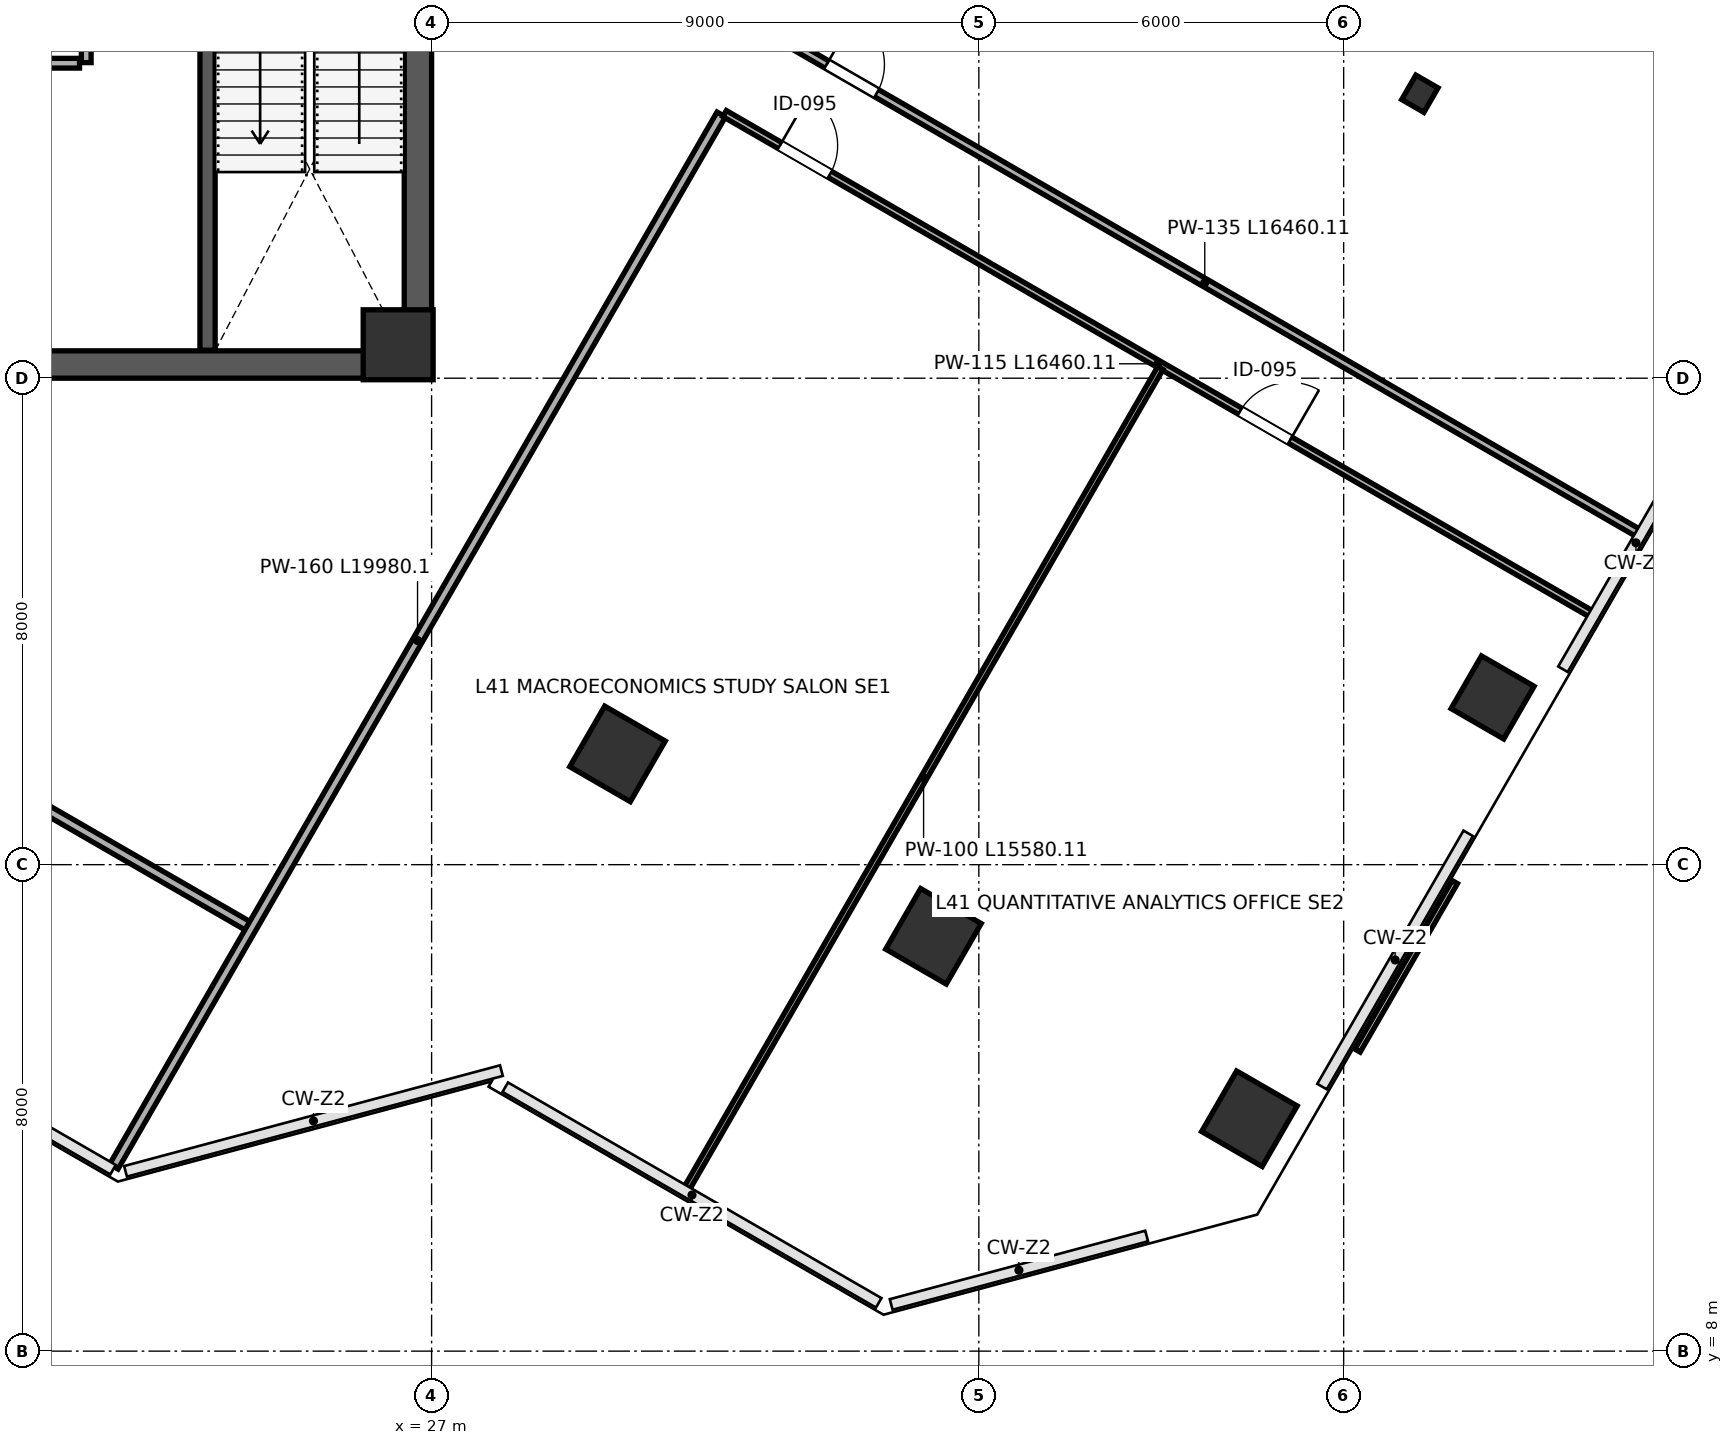
"""IFC4 building model, lengths in metres.
Left out: names, types, materials, properties, quantities, classifications, styles, units other than length and angle.
Written with IfcOpenShell. Run it as: python <this file> out.ifc"""

import sys

from ifc_helpers import new_model, si_unit, direction, frame, frame_2d, origin, origin_2d, place, context, subcontext, project, spatial, rectangle, i_section, extrude, clip, halfspace, source, transform, mapped, element, fill, save


model = new_model("IFC4")
c1 = context("Model", 3, precision=1e-05, world=origin(), true_north=direction((0.0, 1.0)))
c2 = subcontext(c1, "Body", "Model", "MODEL_VIEW")
j1 = project(units=[si_unit("LENGTHUNIT", "METRE"), si_unit("PLANEANGLEUNIT", "RADIAN")], contexts=[c1])
p1 = place(None, origin())
s1 = spatial("IfcSite", under=j1, at=p1, CompositionType="ELEMENT")
p2 = place(p1, origin())
s2 = spatial("IfcBuilding", under=s1, at=p2, CompositionType="ELEMENT")
p3 = place(p2, frame((0.0, 0.0, 183.4)))
s3 = spatial("IfcBuildingStorey", under=s2, at=p3, CompositionType="ELEMENT", Elevation=183.4)
m1 = source(origin(), c2, "Body", "SweptSolid", [
    extrude(rectangle(XDim=1.15, YDim=1.15, at=origin_2d()), origin(), (0.0, 0.0, 1.0), 4.199),
])
p4 = place(p3, frame((26.45, 24.55, 0.001), z_axis=(0.0, 0.0, 1.0), x_axis=(1.0, 0.0, 0.0)))
e1 = element("IfcColumn", 1, at=p4, inside=s3, PredefinedType="COLUMN", context=c2, shape_type="MappedRepresentation", body=[
    mapped(m1, transform((0.0, 0.0, 0.0), scale=1.0)),
])
p5 = place(p3, frame((30.057, 17.822, 0.0), z_axis=(-0.1469926888, -0.084437733161, 0.985526975104), x_axis=(-0.004085638209, 0.996393076163, 0.084759337748)))
e2 = element("IfcColumn", 2, at=p5, inside=s3, PredefinedType="COLUMN", context=c2, shape_type="Clipping", body=[
    clip(clip(extrude(rectangle(XDim=1.15, YDim=1.15, at=origin_2d()), origin(), (0.0, 0.0, 1.0), 4.262), halfspace(frame((0.0, 0.0, 0.136), z_axis=(0.0, 0.0, -1.0), x_axis=(1.0, 0.0, 0.0)), False)), halfspace(frame((0.0, 0.0, 4.126), z_axis=(0.0, 0.0, 1.0), x_axis=(1.0, 0.0, 0.0)), False)),
])
p6 = place(p3, frame((35.253, 14.822, 0.0), z_axis=(-0.176908244936, -0.135429437987, 0.974865293361), x_axis=(-0.139385824296, 0.983952324574, 0.111397553608)))
e3 = element("IfcColumn", 3, at=p6, inside=s3, PredefinedType="COLUMN", context=c2, shape_type="Clipping", body=[
    clip(clip(extrude(rectangle(XDim=1.15, YDim=1.15, at=origin_2d()), origin(), (0.0, 0.0, 1.0), 4.309), halfspace(frame((0.0, 0.0, 0.18), z_axis=(0.0, 0.0, -1.0), x_axis=(1.0, 0.0, 0.0)), False)), halfspace(frame((0.0, 0.0, 4.128), z_axis=(0.0, 0.0, 1.0), x_axis=(1.0, 0.0, 0.0)), False)),
])
p7 = place(p3, frame((43.253, 28.678, 0.0), z_axis=(-0.038418366003, -0.219517330227, 0.974851871252), x_axis=(-0.769030881338, 0.629424774115, 0.111426914518)))
e4 = element("IfcColumn", 4, at=p7, inside=s3, PredefinedType="COLUMN", context=c2, shape_type="Clipping", body=[
    clip(clip(extrude(i_section(OverallWidth=0.421, OverallDepth=0.465, WebThickness=0.045, FlangeThickness=0.072, FilletRadius=0.015, at=origin_2d()), origin(), (0.0, 0.0, 1.0), 4.309), halfspace(frame((0.0, 0.0, 0.071), z_axis=(0.0, 0.0, -1.0), x_axis=(1.0, 0.0, 0.0)), False)), halfspace(frame((0.0, 0.0, 4.238), z_axis=(0.0, 0.0, 1.0), x_axis=(1.0, 0.0, 0.0)), False)),
])
p8 = place(p3, frame((40.45, 11.822, 0.0), z_axis=(-0.20551824904, -0.184737387762, 0.961058971591), x_axis=(-0.221571063236, 0.96530557372, 0.138171680461)))
e5 = element("IfcColumn", 5, at=p8, inside=s3, PredefinedType="COLUMN", context=c2, shape_type="Clipping", body=[
    clip(clip(extrude(rectangle(XDim=1.15, YDim=1.15, at=origin_2d()), origin(), (0.0, 0.0, 1.0), 4.37), halfspace(frame((0.0, 0.0, 0.227), z_axis=(0.0, 0.0, -1.0), x_axis=(1.0, 0.0, 0.0)), False)), halfspace(frame((0.0, 0.0, 4.144), z_axis=(0.0, 0.0, 1.0), x_axis=(1.0, 0.0, 0.0)), False)),
])
p9 = place(p3, frame((44.45, 18.75, 0.0), z_axis=(-0.137694978476, -0.226857660916, 0.964145058892), x_axis=(-0.490193679652, 0.861454630306, 0.132687890757)))
e6 = element("IfcColumn", 6, at=p9, inside=s3, PredefinedType="COLUMN", context=c2, shape_type="Clipping", body=[
    clip(clip(extrude(rectangle(XDim=1.0, YDim=1.0, at=origin_2d()), origin(), (0.0, 0.0, 1.0), 4.356), halfspace(frame((0.0, 0.0, 0.189), z_axis=(0.0, 0.0, -1.0), x_axis=(1.0, 0.0, 0.0)), False)), halfspace(frame((0.0, 0.0, 4.168), z_axis=(0.0, 0.0, 1.0), x_axis=(1.0, 0.0, 0.0)), False)),
])
p10 = place(p3, frame((26.775, 24.45, 0.0), z_axis=(0.0, 0.0, 1.0), x_axis=(0.0, 1.0, 0.0)))
e7 = element("IfcWall", 7, at=p10, inside=s3, PredefinedType="SHEAR", context=c2, shape_type="SweptSolid", body=[
    extrude(rectangle(XDim=15.1, YDim=0.45, at=frame_2d((7.55, 0.0))), origin(), (0.0, 0.0, 1.0), 3.96),
])
p11 = place(p10, frame((8.6, 0.0, 0.0)))
e8 = element("IfcOpeningElement", 8, at=p11, cuts=e7, PredefinedType="OPENING", context=c2, shape_type="SweptSolid", body=[
    extrude(rectangle(XDim=1.15, YDim=2.2, at=frame_2d((0.575, 1.1))), frame((0.0, 0.235, 0.0), z_axis=(0.0, -1.0, 0.0), x_axis=(1.0, 0.0, 0.0)), (0.0, 0.0, 1.0), 0.47),
])
p12 = place(p3, frame((9.0, 24.225, 0.0), z_axis=(0.0, 0.0, 1.0), x_axis=(1.0, 0.0, 0.0)))
e9 = element("IfcWall", 9, at=p12, inside=s3, PredefinedType="SHEAR", context=c2, shape_type="SweptSolid", body=[
    extrude(rectangle(XDim=18.0, YDim=0.45, at=frame_2d((9.0, 0.0))), origin(), (0.0, 0.0, 1.0), 3.96),
])
p13 = place(p3, frame((23.315, 24.46, 0.0), z_axis=(0.0, 0.0, 1.0), x_axis=(0.0, 1.0, 0.0)))
e10 = element("IfcWall", 10, at=p13, inside=s3, PredefinedType="SHEAR", context=c2, shape_type="SweptSolid", body=[
    extrude(rectangle(XDim=7.49, YDim=0.25, at=frame_2d((3.745, 0.0))), origin(), (0.0, 0.0, 1.0), 3.96),
])
p14 = place(p3, frame((12.84, 29.18, 0.0), z_axis=(0.0, 0.0, 1.0), x_axis=(1.0, 0.0, 0.0)))
e11 = element("IfcWall", 11, at=p14, inside=s3, PredefinedType="PARTITIONING", context=c2, shape_type="SweptSolid", body=[
    extrude(rectangle(XDim=8.37, YDim=0.16, at=frame_2d((4.185, 0.0))), origin(), (0.0, 0.0, 1.0), 3.96),
])
p15 = place(p14, frame((0.95, 0.0, 0.0)))
e12 = element("IfcOpeningElement", 12, at=p15, cuts=e11, PredefinedType="OPENING", context=c2, shape_type="SweptSolid", body=[
    extrude(rectangle(XDim=0.85, YDim=2.1, at=frame_2d((0.425, 1.05))), frame((0.0, 0.09, 0.0), z_axis=(0.0, -1.0, 0.0), x_axis=(1.0, 0.0, 0.0)), (0.0, 0.0, 1.0), 0.18),
])
p16 = place(p14, frame((4.2, 0.0, 0.0)))
e13 = element("IfcOpeningElement", 13, at=p16, cuts=e11, PredefinedType="OPENING", context=c2, shape_type="SweptSolid", body=[
    extrude(rectangle(XDim=0.85, YDim=2.1, at=frame_2d((0.425, 1.05))), frame((0.0, 0.09, 0.0), z_axis=(0.0, -1.0, 0.0), x_axis=(1.0, 0.0, 0.0)), (0.0, 0.0, 1.0), 0.18),
])
p17 = place(p3, frame((21.32, 29.19, 0.0), z_axis=(0.0, 0.0, 1.0), x_axis=(0.0, 1.0, 0.0)))
e14 = element("IfcWall", 14, at=p17, inside=s3, PredefinedType="PARTITIONING", context=c2, shape_type="SweptSolid", body=[
    extrude(rectangle(XDim=2.92, YDim=0.16, at=frame_2d((1.46, 0.0))), origin(), (0.0, 0.0, 1.0), 3.96),
])
p18 = place(p3, frame((6.692, 24.972, 0.0), z_axis=(0.0, 0.0, 1.0), x_axis=(0.866021861762, -0.500006134913, 0.0)))
e15 = element("IfcWall", 15, at=p18, inside=s3, PredefinedType="PARTITIONING", context=c2, shape_type="SweptSolid", body=[
    extrude(rectangle(XDim=19.99, YDim=0.16, at=frame_2d((9.995, 0.0))), origin(), (0.0, 0.0, 1.0), 3.96),
])
p19 = place(p18, frame((4.25, 0.0, 0.0)))
e16 = element("IfcOpeningElement", 16, at=p19, cuts=e15, PredefinedType="OPENING", context=c2, shape_type="SweptSolid", body=[
    extrude(rectangle(XDim=0.95, YDim=2.15, at=frame_2d((0.475, 1.075))), frame((0.0, 0.09, 0.0), z_axis=(0.0, -1.0, 0.0), x_axis=(1.0, 0.0, 0.0)), (0.0, 0.0, 1.0), 0.18),
])
p20 = place(p3, frame((21.774, 11.034, 0.0), z_axis=(0.0, 0.0, 1.0), x_axis=(0.500008037328, 0.866020763381, 0.0)))
e17 = element("IfcWall", 17, at=p20, inside=s3, PredefinedType="PARTITIONING", context=c2, shape_type="SweptSolid", body=[
    extrude(rectangle(XDim=19.98, YDim=0.16, at=frame_2d((9.99, 0.0))), origin(), (0.0, 0.0, 1.0), 3.96),
])
p21 = place(p3, frame((32.588, 29.686, 0.0), z_axis=(0.0, 0.0, 1.0), x_axis=(0.86602750728, -0.499996356621, 0.0)))
e18 = element("IfcWall", 18, at=p21, inside=s3, PredefinedType="PARTITIONING", context=c2, shape_type="SweptSolid", body=[
    extrude(rectangle(XDim=16.46, YDim=0.135, at=frame_2d((8.23, 0.0))), origin(), (0.0, 0.0, 1.0), 3.96),
])
p22 = place(p21, frame((1.05, 0.0, 0.0)))
e19 = element("IfcOpeningElement", 19, at=p22, cuts=e18, PredefinedType="OPENING", context=c2, shape_type="SweptSolid", body=[
    extrude(rectangle(XDim=0.95, YDim=2.15, at=frame_2d((0.475, 1.075))), frame((0.0, 0.078, 0.0), z_axis=(0.0, -1.0, 0.0), x_axis=(1.0, 0.0, 0.0)), (0.0, 0.0, 1.0), 0.155),
])
p23 = place(p3, frame((31.818, 28.352, 0.0), z_axis=(0.0, 0.0, 1.0), x_axis=(0.86602750728, -0.499996356621, 0.0)))
e20 = element("IfcWall", 20, at=p23, inside=s3, PredefinedType="PARTITIONING", context=c2, shape_type="SweptSolid", body=[
    extrude(rectangle(XDim=16.46, YDim=0.115, at=frame_2d((8.23, 0.0))), origin(), (0.0, 0.0, 1.0), 3.96),
])
p24 = place(p23, frame((1.05, 0.0, 0.0)))
e21 = element("IfcOpeningElement", 21, at=p24, cuts=e20, PredefinedType="OPENING", context=c2, shape_type="SweptSolid", body=[
    extrude(rectangle(XDim=0.95, YDim=2.15, at=frame_2d((0.475, 1.075))), frame((0.0, 0.067, 0.0), z_axis=(0.0, -1.0, 0.0), x_axis=(1.0, 0.0, 0.0)), (0.0, 0.0, 1.0), 0.135),
])
p25 = place(p23, frame((9.79, 0.0, 0.0)))
e22 = element("IfcOpeningElement", 22, at=p25, cuts=e20, PredefinedType="OPENING", context=c2, shape_type="SweptSolid", body=[
    extrude(rectangle(XDim=0.95, YDim=2.15, at=frame_2d((0.475, 1.075))), frame((0.0, 0.067, 0.0), z_axis=(0.0, -1.0, 0.0), x_axis=(1.0, 0.0, 0.0)), (0.0, 0.0, 1.0), 0.135),
])
p26 = place(p3, frame((31.196, 10.675, 0.0), z_axis=(0.0, 0.0, 1.0), x_axis=(0.500001880682, 0.866024317969, 0.0)))
e23 = element("IfcWall", 23, at=p26, inside=s3, PredefinedType="PARTITIONING", context=c2, shape_type="SweptSolid", body=[
    extrude(rectangle(XDim=15.58, YDim=0.1, at=frame_2d((7.79, 0.0))), origin(), (0.0, 0.0, 1.0), 3.96),
])
m2 = source(origin(), c2, "Body", "SweptSolid", [
    extrude(rectangle(XDim=0.95, YDim=2.15, at=frame_2d((0.475, 1.075))), frame((0.0, 0.025, 0.0), z_axis=(0.0, -1.0, 0.0), x_axis=(1.0, 0.0, 0.0)), (0.0, 0.0, 1.0), 0.05),
])
p27 = place(p22, origin())
e24 = element("IfcDoor", 24, at=p27, inside=s3, OperationType="SINGLE_SWING_LEFT", PredefinedType="DOOR", context=c2, shape_type="MappedRepresentation", body=[
    mapped(m2, transform((0.0, 0.0, 0.0), scale=1.0)),
])
fill(e19, e24)
p28 = place(p24, origin())
e25 = element("IfcDoor", 25, at=p28, inside=s3, OperationType="SINGLE_SWING_LEFT", PredefinedType="DOOR", context=c2, shape_type="MappedRepresentation", body=[
    mapped(m2, transform((0.0, 0.0, 0.0), scale=1.0)),
])
fill(e21, e25)
p29 = place(p25, origin())
e26 = element("IfcDoor", 26, at=p29, inside=s3, OperationType="SINGLE_SWING_RIGHT", PredefinedType="DOOR", context=c2, shape_type="MappedRepresentation", body=[
    mapped(m2, transform((0.0, 0.0, 0.0), scale=1.0)),
])
fill(e22, e26)
save(model, sys.argv[1])
